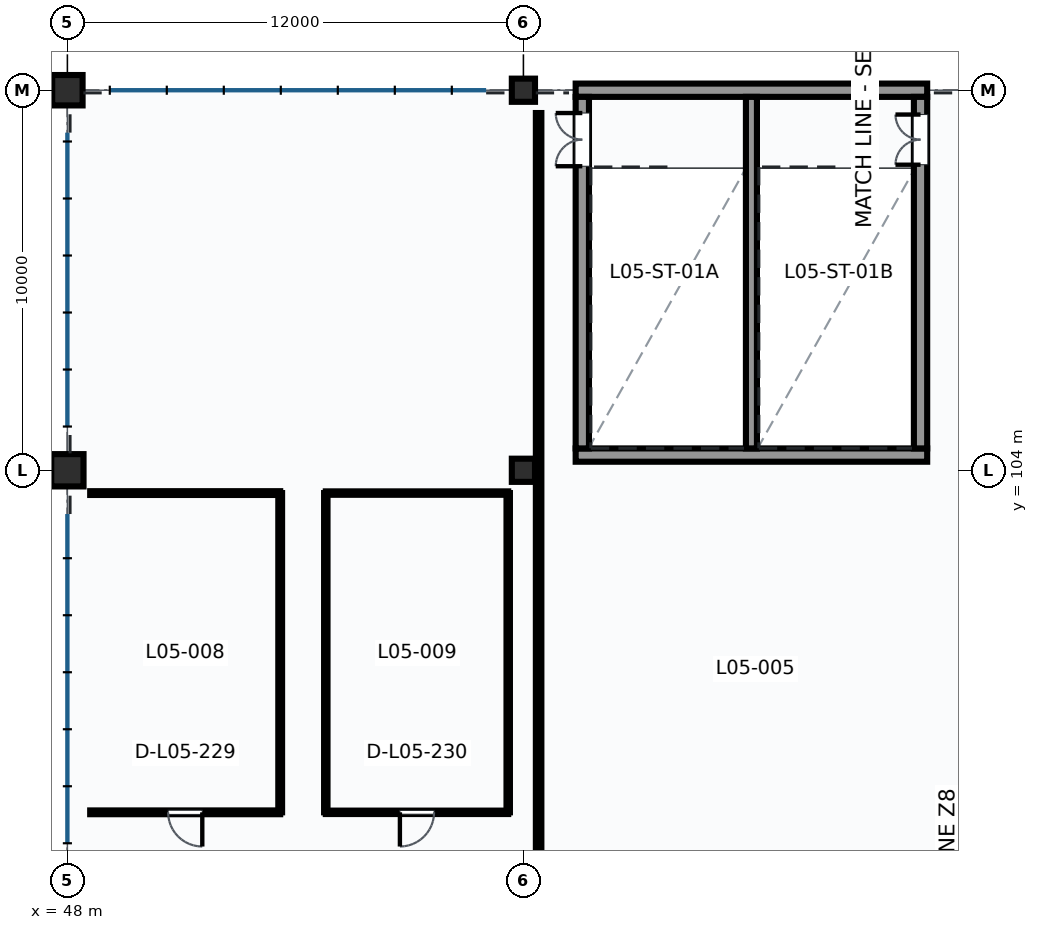
"""IFC4 building model, lengths in metres.
Left out: names, types, materials, properties, quantities, classifications, styles, units other than length and angle.
Written with IfcOpenShell. Run it as: python <this file> out.ifc"""

import sys

from ifc_helpers import new_model, si_unit, direction, frame, frame_2d, origin, origin_2d, place, context, subcontext, project, spatial, rectangle, hollow_circle, extrude, element, fill, save


model = new_model("IFC4")
c1 = context("Model", 3, precision=1e-05, world=origin(), true_north=direction((0.0, 1.0)))
c2 = subcontext(c1, "Body", "Model", "MODEL_VIEW")
j1 = project(units=[si_unit("LENGTHUNIT", "METRE"), si_unit("PLANEANGLEUNIT", "RADIAN")], contexts=[c1])
p1 = place(None, origin())
s1 = spatial("IfcSite", under=j1, at=p1, CompositionType="ELEMENT")
p2 = place(p1, origin())
s2 = spatial("IfcBuilding", under=s1, at=p2, CompositionType="ELEMENT")
p3 = place(p2, frame((0.0, 0.0, 24.6)))
s3 = spatial("IfcBuildingStorey", under=s2, at=p3, CompositionType="ELEMENT", Elevation=24.6)
p4 = place(p3, frame((48.0, 104.0, 0.0), z_axis=(0.0, 0.0, 1.0), x_axis=(1.0, 0.0, 0.0)))
e1 = element("IfcColumn", 1, at=p4, inside=s3, PredefinedType="COLUMN", context=c2, shape_type="SweptSolid", body=[
    extrude(rectangle(XDim=0.85, YDim=0.85, at=origin_2d()), origin(), (0.0, 0.0, 1.0), 4.8),
])
p5 = place(p3, frame((48.0, 114.0, 0.0), z_axis=(0.0, 0.0, 1.0), x_axis=(1.0, 0.0, 0.0)))
e2 = element("IfcColumn", 2, at=p5, inside=s3, PredefinedType="COLUMN", context=c2, shape_type="SweptSolid", body=[
    extrude(rectangle(XDim=0.8, YDim=0.8, at=origin_2d()), origin(), (0.0, 0.0, 1.0), 4.8),
])
for number, where, z_axis, x_axis in (
    (3, (60.0, 104.0, 0.0), (0.0, 0.0, 1.0), (1.0, 0.0, 0.0)),
    (4, (60.0, 114.0, 0.0), (0.0, 0.0, 1.0), (1.0, 0.0, 0.0)),
):
    element("IfcColumn", number, at=place(p3, frame(where, z_axis=z_axis, x_axis=x_axis)), inside=s3, PredefinedType="COLUMN", context=c2, shape_type="SweptSolid", body=[
        extrude(hollow_circle(Radius=0.305, WallThickness=0.025, at=origin_2d()), origin(), (0.0, 0.0, 1.0), 4.8),
    ])
for number, where, z_axis, x_axis in (
    (5, (61.375, 104.4, 0.0), (0.0, 0.0, 1.0), (1.0, 0.0, 0.0)),
    (6, (61.375, 114.0, 0.0), (0.0, 0.0, 1.0), (1.0, 0.0, 0.0)),
):
    element("IfcWall", number, at=place(p3, frame(where, z_axis=z_axis, x_axis=x_axis)), inside=s3, PredefinedType="SHEAR", context=c2, shape_type="SweptSolid", body=[
        extrude(rectangle(XDim=9.25, YDim=0.35, at=frame_2d((4.625, 0.0))), origin(), (0.0, 0.0, 1.0), 3.9),
    ])
p6 = place(p3, frame((61.55, 104.575, 0.0), z_axis=(0.0, 0.0, 1.0), x_axis=(0.0, 1.0, 0.0)))
e7 = element("IfcWall", 7, at=p6, inside=s3, PredefinedType="SHEAR", context=c2, shape_type="SweptSolid", body=[
    extrude(rectangle(XDim=9.25, YDim=0.35, at=frame_2d((4.625, 0.0))), origin(), (0.0, 0.0, 1.0), 3.9),
])
p7 = place(p6, frame((7.425, 0.0, 0.0)))
e8 = element("IfcOpeningElement", 8, at=p7, cuts=e7, PredefinedType="OPENING", context=c2, shape_type="SweptSolid", body=[
    extrude(rectangle(XDim=1.4, YDim=2.2, at=frame_2d((0.7, 1.1))), frame((0.0, 0.185, 0.0), z_axis=(0.0, -1.0, 0.0), x_axis=(1.0, 0.0, 0.0)), (0.0, 0.0, 1.0), 0.37),
])
p8 = place(p3, frame((70.45, 104.575, 0.0), z_axis=(0.0, 0.0, 1.0), x_axis=(0.0, 1.0, 0.0)))
e9 = element("IfcWall", 9, at=p8, inside=s3, PredefinedType="SHEAR", context=c2, shape_type="SweptSolid", body=[
    extrude(rectangle(XDim=9.25, YDim=0.35, at=frame_2d((4.625, 0.0))), origin(), (0.0, 0.0, 1.0), 3.9),
])
p9 = place(p8, frame((7.465, 0.0, 0.0)))
e10 = element("IfcOpeningElement", 10, at=p9, cuts=e9, PredefinedType="OPENING", context=c2, shape_type="SweptSolid", body=[
    extrude(rectangle(XDim=1.32, YDim=2.2, at=frame_2d((0.66, 1.1))), frame((0.0, 0.185, 0.0), z_axis=(0.0, -1.0, 0.0), x_axis=(1.0, 0.0, 0.0)), (0.0, 0.0, 1.0), 0.37),
])
p10 = place(p3, frame((66.0, 104.575, 0.0), z_axis=(0.0, 0.0, 1.0), x_axis=(0.0, 1.0, 0.0)))
e11 = element("IfcWall", 11, at=p10, inside=s3, PredefinedType="SHEAR", context=c2, shape_type="SweptSolid", body=[
    extrude(rectangle(XDim=9.25, YDim=0.29, at=frame_2d((4.625, 0.0))), origin(), (0.0, 0.0, 1.0), 3.9),
])
p11 = place(p3, frame((60.4, 93.4, 0.0), z_axis=(0.0, 0.0, 1.0), x_axis=(0.0, 1.0, 0.0)))
e12 = element("IfcWall", 12, at=p11, inside=s3, PredefinedType="PARTITIONING", context=c2, shape_type="SweptSolid", body=[
    extrude(rectangle(XDim=20.0, YDim=0.145, at=frame_2d((10.0, 0.0))), origin(), (0.0, 0.0, 1.0), 4.58),
])
p12 = place(p3, frame((53.6, 103.4, 0.0), z_axis=(0.0, 0.0, 1.0), x_axis=(0.0, -1.0, 0.0)))
e13 = element("IfcWall", 13, at=p12, inside=s3, PredefinedType="PARTITIONING", context=c2, shape_type="SweptSolid", body=[
    extrude(rectangle(XDim=8.4, YDim=0.1, at=frame_2d((4.2, 0.0))), origin(), (0.0, 0.0, 1.0), 4.58),
])
p13 = place(p3, frame((53.6, 95.0, 0.0), z_axis=(0.0, 0.0, 1.0), x_axis=(-1.0, 0.0, 0.0)))
e14 = element("IfcWall", 14, at=p13, inside=s3, PredefinedType="PARTITIONING", context=c2, shape_type="SweptSolid", body=[
    extrude(rectangle(XDim=5.0, YDim=0.1, at=frame_2d((2.5, 0.0))), origin(), (0.0, 0.0, 1.0), 4.58),
])
p14 = place(p13, frame((2.05, 0.0, 0.0)))
e15 = element("IfcOpeningElement", 15, at=p14, cuts=e14, PredefinedType="OPENING", context=c2, shape_type="SweptSolid", body=[
    extrude(rectangle(XDim=0.9, YDim=2.1, at=frame_2d((0.45, 1.05))), frame((0.0, 0.06, 0.0), z_axis=(0.0, -1.0, 0.0), x_axis=(1.0, 0.0, 0.0)), (0.0, 0.0, 1.0), 0.12),
])
p15 = place(p3, frame((48.6, 103.4, 0.0), z_axis=(0.0, 0.0, 1.0), x_axis=(1.0, 0.0, 0.0)))
e16 = element("IfcWall", 16, at=p15, inside=s3, PredefinedType="PARTITIONING", context=c2, shape_type="SweptSolid", body=[
    extrude(rectangle(XDim=5.0, YDim=0.1, at=frame_2d((2.5, 0.0))), origin(), (0.0, 0.0, 1.0), 4.58),
])
p16 = place(p3, frame((59.6, 103.4, 0.0), z_axis=(0.0, 0.0, 1.0), x_axis=(0.0, -1.0, 0.0)))
e17 = element("IfcWall", 17, at=p16, inside=s3, PredefinedType="PARTITIONING", context=c2, shape_type="SweptSolid", body=[
    extrude(rectangle(XDim=8.4, YDim=0.09, at=frame_2d((4.2, 0.0))), origin(), (0.0, 0.0, 1.0), 4.58),
])
p17 = place(p3, frame((59.6, 95.0, 0.0), z_axis=(0.0, 0.0, 1.0), x_axis=(-1.0, 0.0, 0.0)))
e18 = element("IfcWall", 18, at=p17, inside=s3, PredefinedType="PARTITIONING", context=c2, shape_type="SweptSolid", body=[
    extrude(rectangle(XDim=4.8, YDim=0.09, at=frame_2d((2.4, 0.0))), origin(), (0.0, 0.0, 1.0), 4.58),
])
p18 = place(p17, frame((1.95, 0.0, 0.0)))
e19 = element("IfcOpeningElement", 19, at=p18, cuts=e18, PredefinedType="OPENING", context=c2, shape_type="SweptSolid", body=[
    extrude(rectangle(XDim=0.9, YDim=2.1, at=frame_2d((0.45, 1.05))), frame((0.0, 0.055, 0.0), z_axis=(0.0, -1.0, 0.0), x_axis=(1.0, 0.0, 0.0)), (0.0, 0.0, 1.0), 0.11),
])
p19 = place(p3, frame((54.8, 95.0, 0.0), z_axis=(0.0, 0.0, 1.0), x_axis=(0.0, 1.0, 0.0)))
e20 = element("IfcWall", 20, at=p19, inside=s3, PredefinedType="PARTITIONING", context=c2, shape_type="SweptSolid", body=[
    extrude(rectangle(XDim=8.4, YDim=0.09, at=frame_2d((4.2, 0.0))), origin(), (0.0, 0.0, 1.0), 4.58),
])
p20 = place(p3, frame((54.8, 103.4, 0.0), z_axis=(0.0, 0.0, 1.0), x_axis=(1.0, 0.0, 0.0)))
e21 = element("IfcWall", 21, at=p20, inside=s3, PredefinedType="PARTITIONING", context=c2, shape_type="SweptSolid", body=[
    extrude(rectangle(XDim=4.8, YDim=0.09, at=frame_2d((2.4, 0.0))), origin(), (0.0, 0.0, 1.0), 4.58),
])
p21 = place(p7, frame((1.4, 0.0, 0.0), z_axis=(0.0, 0.0, 1.0), x_axis=(-1.0, 0.0, 0.0)))
e22 = element("IfcDoor", 22, at=p21, inside=s3, OperationType="DOUBLE_DOOR_SINGLE_SWING", PredefinedType="DOOR", context=c2, shape_type="SweptSolid", body=[
    extrude(rectangle(XDim=1.4, YDim=2.2, at=frame_2d((0.7, 1.1))), frame((0.0, 0.025, 0.0), z_axis=(0.0, -1.0, 0.0), x_axis=(1.0, 0.0, 0.0)), (0.0, 0.0, 1.0), 0.05),
])
fill(e8, e22)
p22 = place(p9, origin())
e23 = element("IfcDoor", 23, at=p22, inside=s3, OperationType="DOUBLE_DOOR_SINGLE_SWING", PredefinedType="DOOR", context=c2, shape_type="SweptSolid", body=[
    extrude(rectangle(XDim=1.32, YDim=2.2, at=frame_2d((0.66, 1.1))), frame((0.0, 0.025, 0.0), z_axis=(0.0, -1.0, 0.0), x_axis=(1.0, 0.0, 0.0)), (0.0, 0.0, 1.0), 0.05),
])
fill(e10, e23)
p23 = place(p14, origin())
e24 = element("IfcDoor", 24, at=p23, inside=s3, OperationType="SINGLE_SWING_LEFT", PredefinedType="DOOR", context=c2, shape_type="SweptSolid", body=[
    extrude(rectangle(XDim=0.9, YDim=2.1, at=frame_2d((0.45, 1.05))), frame((0.0, 0.025, 0.0), z_axis=(0.0, -1.0, 0.0), x_axis=(1.0, 0.0, 0.0)), (0.0, 0.0, 1.0), 0.05),
])
fill(e15, e24)
p24 = place(p18, origin())
e25 = element("IfcDoor", 25, at=p24, inside=s3, OperationType="SINGLE_SWING_RIGHT", PredefinedType="DOOR", context=c2, shape_type="SweptSolid", body=[
    extrude(rectangle(XDim=0.9, YDim=2.1, at=frame_2d((0.45, 1.05))), frame((0.0, 0.025, 0.0), z_axis=(0.0, -1.0, 0.0), x_axis=(1.0, 0.0, 0.0)), (0.0, 0.0, 1.0), 0.05),
])
fill(e19, e25)
save(model, sys.argv[1])
